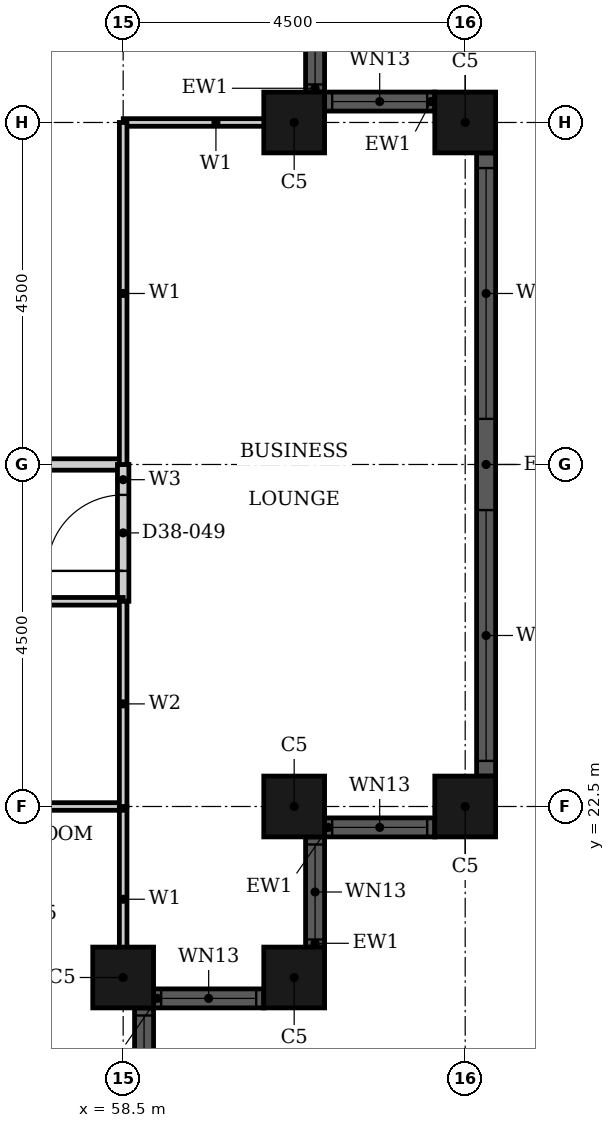
"""IFC4 building model, lengths in metres.
Left out: names, types, materials, properties, quantities, classifications, styles, units other than length and angle.
Written with IfcOpenShell. Run it as: python <this file> out.ifc"""

import sys

from ifc_helpers import new_model, si_unit, direction, frame, frame_2d, origin, origin_2d, place, context, subcontext, project, spatial, rectangle, hollow_rectangle, extrude, element, fill, save


model = new_model("IFC4")
c1 = context("Model", 3, precision=1e-05, world=origin(), true_north=direction((0.0, 1.0)))
c2 = subcontext(c1, "Body", "Model", "MODEL_VIEW")
j1 = project(units=[si_unit("LENGTHUNIT", "METRE"), si_unit("PLANEANGLEUNIT", "RADIAN")], contexts=[c1])
p1 = place(None, origin())
s1 = spatial("IfcSite", under=j1, at=p1, CompositionType="ELEMENT")
p2 = place(p1, origin())
s2 = spatial("IfcBuilding", under=s1, at=p2, CompositionType="ELEMENT")
p3 = place(p2, frame((0.0, 0.0, 154.3)))
s3 = spatial("IfcBuildingStorey", under=s2, at=p3, CompositionType="ELEMENT", Elevation=154.3)
for number, where, z_axis, x_axis in (
    (1, (58.5, 20.25, 0.0), (0.0, 0.0, 1.0), (1.0, 0.0, 0.0)),
    (2, (60.75, 20.25, 0.0), (0.0, 0.0, 1.0), (1.0, 0.0, 0.0)),
    (3, (60.75, 22.5, 0.0), (0.0, 0.0, 1.0), (1.0, 0.0, 0.0)),
    (4, (63.0, 22.5, 0.0), (0.0, 0.0, 1.0), (1.0, 0.0, 0.0)),
    (5, (63.0, 31.5, 0.0), (0.0, 0.0, 1.0), (1.0, 0.0, 0.0)),
    (6, (60.75, 31.5, 0.0), (0.0, 0.0, 1.0), (1.0, 0.0, 0.0)),
):
    element("IfcColumn", number, at=place(p3, frame(where, z_axis=z_axis, x_axis=x_axis)), inside=s3, PredefinedType="COLUMN", context=c2, shape_type="SweptSolid", body=[
        extrude(hollow_rectangle(XDim=0.8, YDim=0.8, WallThickness=0.025, at=origin_2d()), origin(), (0.0, 0.0, 1.0), 3.7),
    ])
p4 = place(p3, frame((58.775, 18.4, 0.0), z_axis=(0.0, 0.0, 1.0), x_axis=(0.0, 1.0, 0.0)))
e7 = element("IfcWall", 7, at=p4, inside=s3, PredefinedType="SOLIDWALL", context=c2, shape_type="SweptSolid", body=[
    extrude(rectangle(XDim=1.45, YDim=0.25, at=frame_2d((0.725, 0.0))), origin(), (0.0, 0.0, 1.0), 3.7),
])
p5 = place(p4, frame((0.1, 0.0, 0.9)))
e8 = element("IfcOpeningElement", 8, at=p5, cuts=e7, PredefinedType="OPENING", context=c2, shape_type="SweptSolid", body=[
    extrude(rectangle(XDim=1.25, YDim=1.85, at=frame_2d((0.625, 0.925))), frame((0.0, 0.135, 0.0), z_axis=(0.0, -1.0, 0.0), x_axis=(1.0, 0.0, 0.0)), (0.0, 0.0, 1.0), 0.27),
])
p6 = place(p3, frame((58.9, 19.975, 0.0), z_axis=(0.0, 0.0, 1.0), x_axis=(1.0, 0.0, 0.0)))
e9 = element("IfcWall", 9, at=p6, inside=s3, PredefinedType="SOLIDWALL", context=c2, shape_type="SweptSolid", body=[
    extrude(rectangle(XDim=1.45, YDim=0.25, at=frame_2d((0.725, 0.0))), origin(), (0.0, 0.0, 1.0), 3.7),
])
p7 = place(p6, frame((0.1, 0.0, 0.9)))
e10 = element("IfcOpeningElement", 10, at=p7, cuts=e9, PredefinedType="OPENING", context=c2, shape_type="SweptSolid", body=[
    extrude(rectangle(XDim=1.25, YDim=1.85, at=frame_2d((0.625, 0.925))), frame((0.0, 0.135, 0.0), z_axis=(0.0, -1.0, 0.0), x_axis=(1.0, 0.0, 0.0)), (0.0, 0.0, 1.0), 0.27),
])
p8 = place(p3, frame((61.025, 20.65, 0.0), z_axis=(0.0, 0.0, 1.0), x_axis=(0.0, 1.0, 0.0)))
e11 = element("IfcWall", 11, at=p8, inside=s3, PredefinedType="SOLIDWALL", context=c2, shape_type="SweptSolid", body=[
    extrude(rectangle(XDim=1.45, YDim=0.25, at=frame_2d((0.725, 0.0))), origin(), (0.0, 0.0, 1.0), 3.7),
])
p9 = place(p8, frame((0.1, 0.0, 0.9)))
e12 = element("IfcOpeningElement", 12, at=p9, cuts=e11, PredefinedType="OPENING", context=c2, shape_type="SweptSolid", body=[
    extrude(rectangle(XDim=1.25, YDim=1.85, at=frame_2d((0.625, 0.925))), frame((0.0, 0.135, 0.0), z_axis=(0.0, -1.0, 0.0), x_axis=(1.0, 0.0, 0.0)), (0.0, 0.0, 1.0), 0.27),
])
p10 = place(p3, frame((61.15, 22.225, 0.0), z_axis=(0.0, 0.0, 1.0), x_axis=(1.0, 0.0, 0.0)))
e13 = element("IfcWall", 13, at=p10, inside=s3, PredefinedType="SOLIDWALL", context=c2, shape_type="SweptSolid", body=[
    extrude(rectangle(XDim=1.45, YDim=0.25, at=frame_2d((0.725, 0.0))), origin(), (0.0, 0.0, 1.0), 3.7),
])
p11 = place(p10, frame((0.1, 0.0, 0.9)))
e14 = element("IfcOpeningElement", 14, at=p11, cuts=e13, PredefinedType="OPENING", context=c2, shape_type="SweptSolid", body=[
    extrude(rectangle(XDim=1.25, YDim=1.85, at=frame_2d((0.625, 0.925))), frame((0.0, 0.135, 0.0), z_axis=(0.0, -1.0, 0.0), x_axis=(1.0, 0.0, 0.0)), (0.0, 0.0, 1.0), 0.27),
])
p12 = place(p3, frame((63.275, 22.9, 0.0), z_axis=(0.0, 0.0, 1.0), x_axis=(0.0, 1.0, 0.0)))
e15 = element("IfcWall", 15, at=p12, inside=s3, PredefinedType="SOLIDWALL", context=c2, shape_type="SweptSolid", body=[
    extrude(rectangle(XDim=8.2, YDim=0.25, at=frame_2d((4.1, 0.0))), origin(), (0.0, 0.0, 1.0), 3.7),
])
p13 = place(p12, frame((0.2, 0.0, 0.45)))
e16 = element("IfcOpeningElement", 16, at=p13, cuts=e15, PredefinedType="OPENING", context=c2, shape_type="SweptSolid", body=[
    extrude(rectangle(XDim=3.3, YDim=2.3, at=frame_2d((1.65, 1.15))), frame((0.0, 0.135, 0.0), z_axis=(0.0, -1.0, 0.0), x_axis=(1.0, 0.0, 0.0)), (0.0, 0.0, 1.0), 0.27),
])
p14 = place(p12, frame((4.7, 0.0, 0.45)))
e17 = element("IfcOpeningElement", 17, at=p14, cuts=e15, PredefinedType="OPENING", context=c2, shape_type="SweptSolid", body=[
    extrude(rectangle(XDim=3.3, YDim=2.3, at=frame_2d((1.65, 1.15))), frame((0.0, 0.135, 0.0), z_axis=(0.0, -1.0, 0.0), x_axis=(1.0, 0.0, 0.0)), (0.0, 0.0, 1.0), 0.27),
])
p15 = place(p3, frame((62.6, 31.775, 0.0), z_axis=(0.0, 0.0, 1.0), x_axis=(-1.0, 0.0, 0.0)))
e18 = element("IfcWall", 18, at=p15, inside=s3, PredefinedType="SOLIDWALL", context=c2, shape_type="SweptSolid", body=[
    extrude(rectangle(XDim=1.45, YDim=0.25, at=frame_2d((0.725, 0.0))), origin(), (0.0, 0.0, 1.0), 3.7),
])
p16 = place(p15, frame((0.1, 0.0, 0.9)))
e19 = element("IfcOpeningElement", 19, at=p16, cuts=e18, PredefinedType="OPENING", context=c2, shape_type="SweptSolid", body=[
    extrude(rectangle(XDim=1.25, YDim=1.85, at=frame_2d((0.625, 0.925))), frame((0.0, 0.135, 0.0), z_axis=(0.0, -1.0, 0.0), x_axis=(1.0, 0.0, 0.0)), (0.0, 0.0, 1.0), 0.27),
])
p17 = place(p3, frame((61.025, 31.9, 0.0), z_axis=(0.0, 0.0, 1.0), x_axis=(0.0, 1.0, 0.0)))
e20 = element("IfcWall", 20, at=p17, inside=s3, PredefinedType="SOLIDWALL", context=c2, shape_type="SweptSolid", body=[
    extrude(rectangle(XDim=1.45, YDim=0.25, at=frame_2d((0.725, 0.0))), origin(), (0.0, 0.0, 1.0), 3.7),
])
p18 = place(p17, frame((0.1, 0.0, 0.9)))
e21 = element("IfcOpeningElement", 21, at=p18, cuts=e20, PredefinedType="OPENING", context=c2, shape_type="SweptSolid", body=[
    extrude(rectangle(XDim=1.25, YDim=1.85, at=frame_2d((0.625, 0.925))), frame((0.0, 0.135, 0.0), z_axis=(0.0, -1.0, 0.0), x_axis=(1.0, 0.0, 0.0)), (0.0, 0.0, 1.0), 0.27),
])
p19 = place(p3, frame((45.0, 27.0, 0.0), z_axis=(0.0, 0.0, 1.0), x_axis=(1.0, 0.0, 0.0)))
e22 = element("IfcWall", 22, at=p19, inside=s3, PredefinedType="PARTITIONING", context=c2, shape_type="SweptSolid", body=[
    extrude(rectangle(XDim=13.5, YDim=0.15, at=frame_2d((6.75, 0.0))), origin(), (0.0, 0.0, 1.0), 2.68),
])
p20 = place(p19, frame((7.15, 0.0, 0.0)))
e23 = element("IfcOpeningElement", 23, at=p20, cuts=e22, PredefinedType="OPENING", context=c2, shape_type="SweptSolid", body=[
    extrude(rectangle(XDim=1.0, YDim=2.1, at=frame_2d((0.5, 1.05))), frame((0.0, 0.085, 0.0), z_axis=(0.0, -1.0, 0.0), x_axis=(1.0, 0.0, 0.0)), (0.0, 0.0, 1.0), 0.17),
])
p21 = place(p3, frame((58.5, 25.2, 0.0), z_axis=(0.0, 0.0, 1.0), x_axis=(0.0, 1.0, 0.0)))
e24 = element("IfcWall", 24, at=p21, inside=s3, PredefinedType="PARTITIONING", context=c2, shape_type="SweptSolid", body=[
    extrude(rectangle(XDim=1.8, YDim=0.15, at=frame_2d((0.9, 0.0))), origin(), (0.0, 0.0, 1.0), 3.4),
])
p22 = place(p21, frame((0.4, 0.0, 0.0)))
e25 = element("IfcOpeningElement", 25, at=p22, cuts=e24, PredefinedType="OPENING", context=c2, shape_type="SweptSolid", body=[
    extrude(rectangle(XDim=1.0, YDim=2.1, at=frame_2d((0.5, 1.05))), frame((0.0, 0.085, 0.0), z_axis=(0.0, -1.0, 0.0), x_axis=(1.0, 0.0, 0.0)), (0.0, 0.0, 1.0), 0.17),
])
p23 = place(p3, frame((58.501, 31.5, 0.0), z_axis=(0.0, 0.0, 1.0), x_axis=(1.0, 0.0, 0.0)))
e26 = element("IfcWall", 26, at=p23, inside=s3, PredefinedType="PARTITIONING", context=c2, shape_type="SweptSolid", body=[
    extrude(rectangle(XDim=2.439, YDim=0.1, at=frame_2d((1.219, 0.0))), origin(), (0.0, 0.0, 1.0), 2.68),
])
p24 = place(p3, frame((58.5, 27.0, 0.0), z_axis=(0.0, 0.0, 1.0), x_axis=(0.0, 1.0, 0.0)))
e27 = element("IfcWall", 27, at=p24, inside=s3, PredefinedType="PARTITIONING", context=c2, shape_type="SweptSolid", body=[
    extrude(rectangle(XDim=4.5, YDim=0.1, at=frame_2d((2.25, 0.0))), origin(), (0.0, 0.0, 1.0), 3.4),
])
p25 = place(p3, frame((58.5, 20.06, 0.0), z_axis=(0.0, 0.0, 1.0), x_axis=(0.0, 1.0, 0.0)))
e28 = element("IfcWall", 28, at=p25, inside=s3, PredefinedType="PARTITIONING", context=c2, shape_type="SweptSolid", body=[
    extrude(rectangle(XDim=2.439, YDim=0.1, at=frame_2d((1.219, 0.0))), origin(), (0.0, 0.0, 1.0), 3.4),
])
p26 = place(p3, frame((56.1, 22.5, 0.0), z_axis=(0.0, 0.0, 1.0), x_axis=(1.0, 0.0, 0.0)))
e29 = element("IfcWall", 29, at=p26, inside=s3, PredefinedType="PARTITIONING", context=c2, shape_type="SweptSolid", body=[
    extrude(rectangle(XDim=2.4, YDim=0.1, at=frame_2d((1.2, 0.0))), origin(), (0.0, 0.0, 1.0), 2.68),
])
p27 = place(p3, frame((56.1, 25.2, 0.0), z_axis=(0.0, 0.0, 1.0), x_axis=(1.0, 0.0, 0.0)))
e30 = element("IfcWall", 30, at=p27, inside=s3, PredefinedType="PARTITIONING", context=c2, shape_type="SweptSolid", body=[
    extrude(rectangle(XDim=2.4, YDim=0.1, at=frame_2d((1.2, 0.0))), origin(), (0.0, 0.0, 1.0), 3.4),
])
p28 = place(p3, frame((58.5, 22.5, 0.0), z_axis=(0.0, 0.0, 1.0), x_axis=(0.0, 1.0, 0.0)))
e31 = element("IfcWall", 31, at=p28, inside=s3, PredefinedType="PARTITIONING", context=c2, shape_type="SweptSolid", body=[
    extrude(rectangle(XDim=2.7, YDim=0.1, at=frame_2d((1.35, 0.0))), origin(), (0.0, 0.0, 1.0), 3.4),
])
p29 = place(p5, origin())
e32 = element("IfcWindow", 32, at=p29, inside=s3, PartitioningType="SINGLE_PANEL", PredefinedType="WINDOW", context=c2, shape_type="SweptSolid", body=[
    extrude(rectangle(XDim=1.25, YDim=1.85, at=frame_2d((0.625, 0.925))), frame((0.0, 0.03, 0.0), z_axis=(0.0, -1.0, 0.0), x_axis=(1.0, 0.0, 0.0)), (0.0, 0.0, 1.0), 0.06),
])
fill(e8, e32)
p30 = place(p7, origin())
e33 = element("IfcWindow", 33, at=p30, inside=s3, PartitioningType="SINGLE_PANEL", PredefinedType="WINDOW", context=c2, shape_type="SweptSolid", body=[
    extrude(rectangle(XDim=1.25, YDim=1.85, at=frame_2d((0.625, 0.925))), frame((0.0, 0.03, 0.0), z_axis=(0.0, -1.0, 0.0), x_axis=(1.0, 0.0, 0.0)), (0.0, 0.0, 1.0), 0.06),
])
fill(e10, e33)
p31 = place(p9, origin())
e34 = element("IfcWindow", 34, at=p31, inside=s3, PartitioningType="SINGLE_PANEL", PredefinedType="WINDOW", context=c2, shape_type="SweptSolid", body=[
    extrude(rectangle(XDim=1.25, YDim=1.85, at=frame_2d((0.625, 0.925))), frame((0.0, 0.03, 0.0), z_axis=(0.0, -1.0, 0.0), x_axis=(1.0, 0.0, 0.0)), (0.0, 0.0, 1.0), 0.06),
])
fill(e12, e34)
p32 = place(p11, origin())
e35 = element("IfcWindow", 35, at=p32, inside=s3, PartitioningType="SINGLE_PANEL", PredefinedType="WINDOW", context=c2, shape_type="SweptSolid", body=[
    extrude(rectangle(XDim=1.25, YDim=1.85, at=frame_2d((0.625, 0.925))), frame((0.0, 0.03, 0.0), z_axis=(0.0, -1.0, 0.0), x_axis=(1.0, 0.0, 0.0)), (0.0, 0.0, 1.0), 0.06),
])
fill(e14, e35)
p33 = place(p13, origin())
e36 = element("IfcWindow", 36, at=p33, inside=s3, PartitioningType="SINGLE_PANEL", PredefinedType="WINDOW", context=c2, shape_type="SweptSolid", body=[
    extrude(rectangle(XDim=3.3, YDim=2.3, at=frame_2d((1.65, 1.15))), frame((0.0, 0.03, 0.0), z_axis=(0.0, -1.0, 0.0), x_axis=(1.0, 0.0, 0.0)), (0.0, 0.0, 1.0), 0.06),
])
fill(e16, e36)
p34 = place(p14, origin())
e37 = element("IfcWindow", 37, at=p34, inside=s3, PartitioningType="SINGLE_PANEL", PredefinedType="WINDOW", context=c2, shape_type="SweptSolid", body=[
    extrude(rectangle(XDim=3.3, YDim=2.3, at=frame_2d((1.65, 1.15))), frame((0.0, 0.03, 0.0), z_axis=(0.0, -1.0, 0.0), x_axis=(1.0, 0.0, 0.0)), (0.0, 0.0, 1.0), 0.06),
])
fill(e17, e37)
p35 = place(p16, origin())
e38 = element("IfcWindow", 38, at=p35, inside=s3, PartitioningType="SINGLE_PANEL", PredefinedType="WINDOW", context=c2, shape_type="SweptSolid", body=[
    extrude(rectangle(XDim=1.25, YDim=1.85, at=frame_2d((0.625, 0.925))), frame((0.0, 0.03, 0.0), z_axis=(0.0, -1.0, 0.0), x_axis=(1.0, 0.0, 0.0)), (0.0, 0.0, 1.0), 0.06),
])
fill(e19, e38)
p36 = place(p18, origin())
e39 = element("IfcWindow", 39, at=p36, inside=s3, PartitioningType="SINGLE_PANEL", PredefinedType="WINDOW", context=c2, shape_type="SweptSolid", body=[
    extrude(rectangle(XDim=1.25, YDim=1.85, at=frame_2d((0.625, 0.925))), frame((0.0, 0.03, 0.0), z_axis=(0.0, -1.0, 0.0), x_axis=(1.0, 0.0, 0.0)), (0.0, 0.0, 1.0), 0.06),
])
fill(e21, e39)
p37 = place(p22, origin())
e40 = element("IfcDoor", 40, at=p37, inside=s3, OperationType="SINGLE_SWING_RIGHT", PredefinedType="DOOR", context=c2, shape_type="SweptSolid", body=[
    extrude(rectangle(XDim=1.0, YDim=2.1, at=frame_2d((0.5, 1.05))), frame((0.0, 0.025, 0.0), z_axis=(0.0, -1.0, 0.0), x_axis=(1.0, 0.0, 0.0)), (0.0, 0.0, 1.0), 0.05),
])
fill(e25, e40)
save(model, sys.argv[1])
